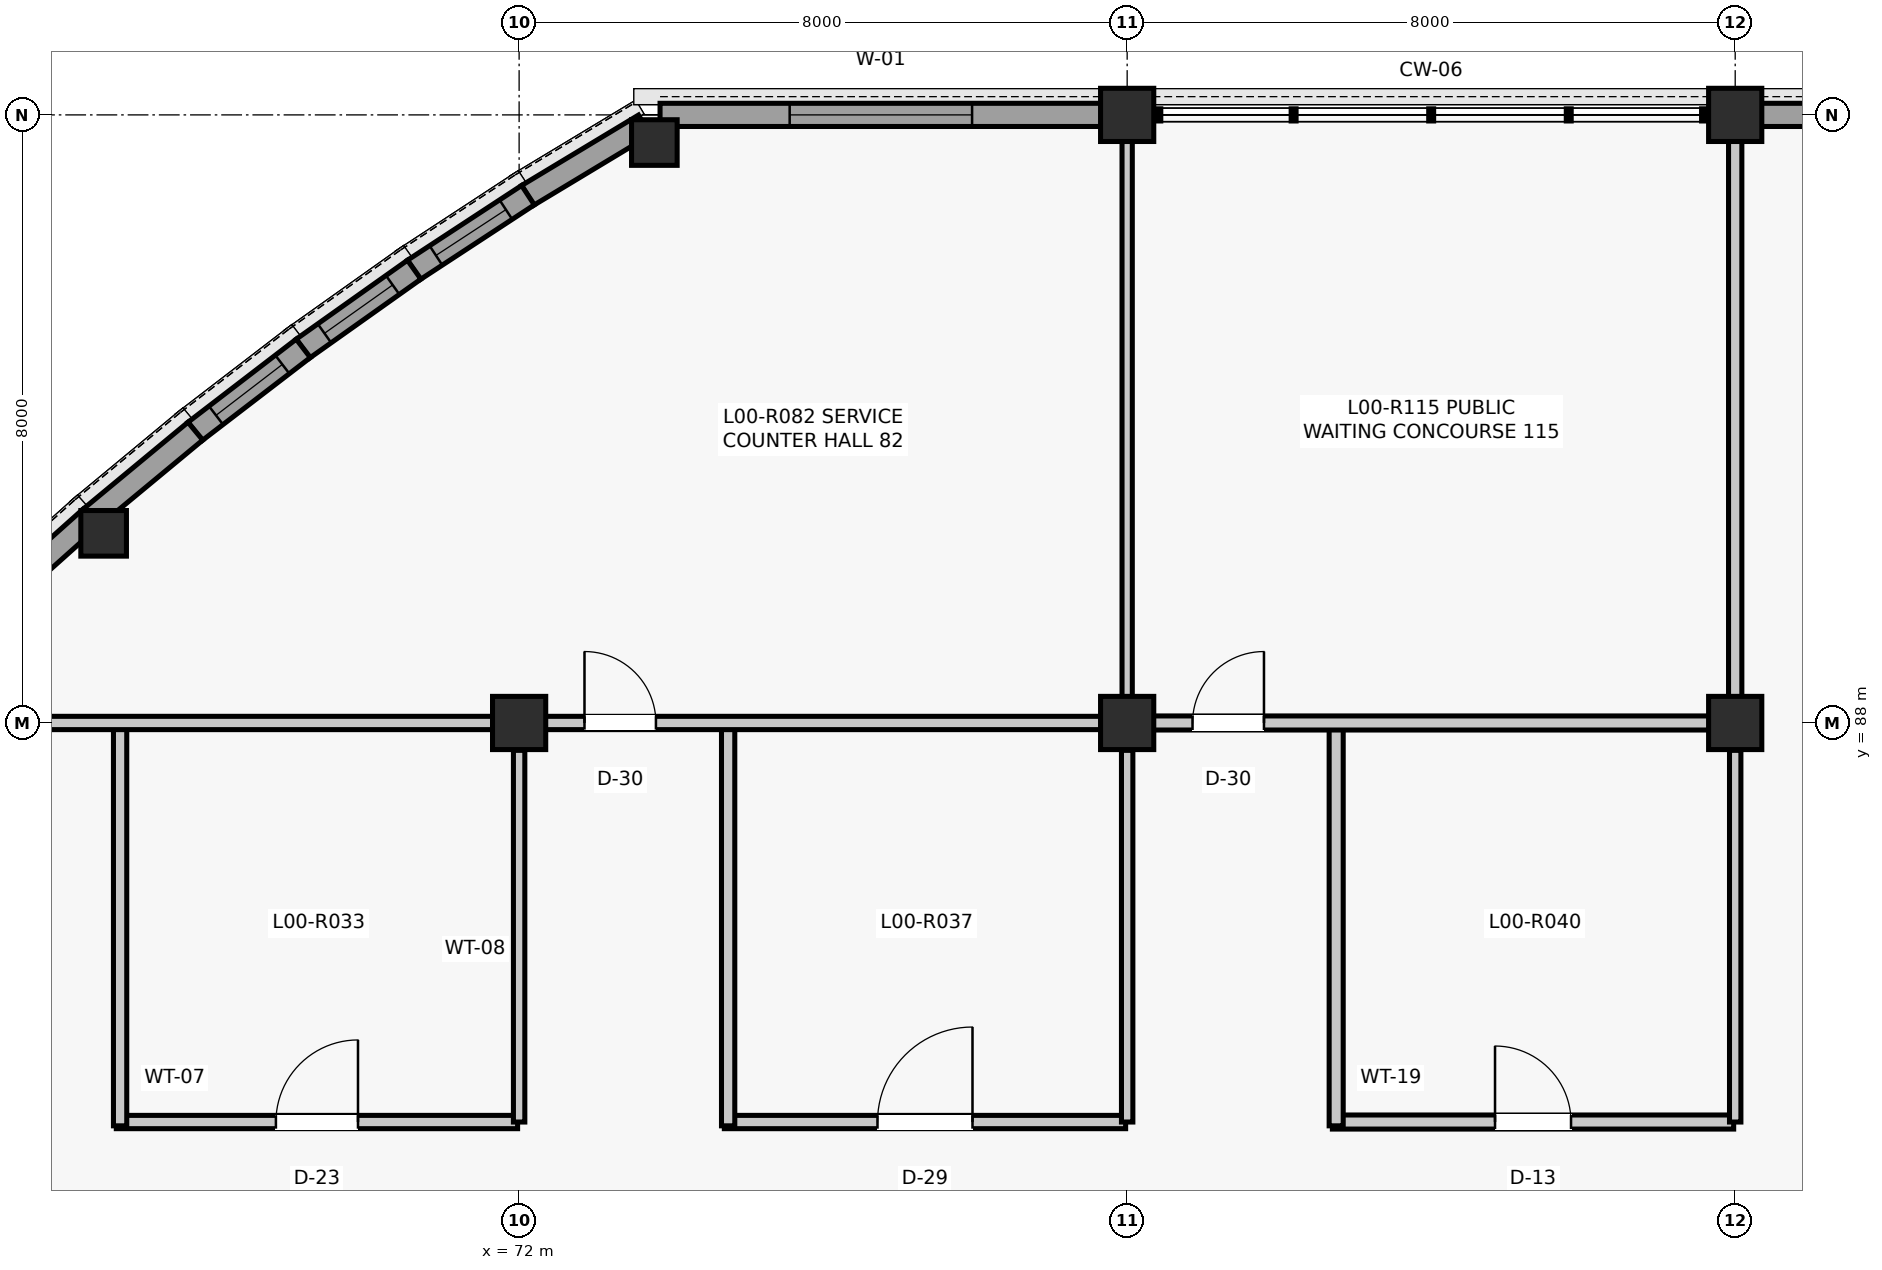
"""IFC4 building model, lengths in metres.
Left out: names, types, materials, properties, quantities, classifications, styles, units other than length and angle.
Written with IfcOpenShell. Run it as: python <this file> out.ifc"""

import sys

from ifc_helpers import new_model, si_unit, direction, frame, frame_2d, origin, origin_2d, place, context, subcontext, project, spatial, rectangle, extrude, element, fill, save


model = new_model("IFC4")
c1 = context("Model", 3, precision=1e-05, world=origin(), true_north=direction((0.0, 1.0)))
c2 = subcontext(c1, "Body", "Model", "MODEL_VIEW")
j1 = project(units=[si_unit("LENGTHUNIT", "METRE"), si_unit("PLANEANGLEUNIT", "RADIAN")], contexts=[c1])
p1 = place(None, origin())
s1 = spatial("IfcSite", under=j1, at=p1, CompositionType="ELEMENT")
p2 = place(p1, origin())
s2 = spatial("IfcBuilding", under=s1, at=p2, CompositionType="ELEMENT")
p3 = place(p2, origin())
s3 = spatial("IfcBuildingStorey", under=s2, at=p3, CompositionType="ELEMENT", Elevation=0.0)
for number, where, z_axis, x_axis in (
    (1, (72.0, 88.0, 0.0), (0.0, 0.0, 1.0), (1.0, 0.0, 0.0)),
    (2, (80.0, 88.0, 0.0), (0.0, 0.0, 1.0), (1.0, 0.0, 0.0)),
    (3, (80.0, 96.0, 0.0), (0.0, 0.0, 1.0), (1.0, 0.0, 0.0)),
    (4, (88.0, 88.0, 0.0), (0.0, 0.0, 1.0), (1.0, 0.0, 0.0)),
    (5, (88.0, 96.0, 0.0), (0.0, 0.0, 1.0), (1.0, 0.0, 0.0)),
):
    element("IfcColumn", number, at=place(p3, frame(where, z_axis=z_axis, x_axis=x_axis)), inside=s3, PredefinedType="COLUMN", context=c2, shape_type="SweptSolid", body=[
        extrude(rectangle(XDim=0.7, YDim=0.7, at=origin_2d()), origin(), (0.0, 0.0, 1.0), 5.28),
    ])
for number, where, z_axis, x_axis in (
    (6, (73.779, 95.636, 0.0), (0.0, 0.0, 1.0), (1.0, 0.0, 0.0)),
    (7, (66.533, 90.495, 0.0), (0.0, 0.0, 1.0), (1.0, 0.0, 0.0)),
):
    element("IfcColumn", number, at=place(p3, frame(where, z_axis=z_axis, x_axis=x_axis)), inside=s3, PredefinedType="COLUMN", context=c2, shape_type="SweptSolid", body=[
        extrude(rectangle(XDim=0.6, YDim=0.6, at=origin_2d()), origin(), (0.0, 0.0, 1.0), 5.28),
    ])
p4 = place(p3, frame((73.649, 95.867, 0.0), z_axis=(0.0, 0.0, 1.0), x_axis=(-0.856543302071, -0.51607516088, 0.0)))
e8 = element("IfcWall", 8, at=p4, inside=s3, PredefinedType="SOLIDWALL", context=c2, shape_type="SweptSolid", body=[
    extrude(rectangle(XDim=1.795, YDim=0.305, at=frame_2d((0.897, 0.0))), origin(), (0.0, 0.0, 1.0), 5.035),
])
p5 = place(p3, frame((72.117, 94.944, 0.0), z_axis=(0.0, 0.0, 1.0), x_axis=(-0.836686786408, -0.547681678944, 0.0)))
e9 = element("IfcWall", 9, at=p5, inside=s3, PredefinedType="SOLIDWALL", context=c2, shape_type="SweptSolid", body=[
    extrude(rectangle(XDim=1.795, YDim=0.305, at=frame_2d((0.897, 0.0))), origin(), (0.0, 0.0, 1.0), 5.035),
])
p6 = place(p5, frame((0.347, 0.0, 0.9)))
e10 = element("IfcOpeningElement", 10, at=p6, cuts=e9, PredefinedType="OPENING", context=c2, shape_type="SweptSolid", body=[
    extrude(rectangle(XDim=1.1, YDim=2.1, at=frame_2d((0.55, 1.05))), frame((0.0, 0.162, 0.0), z_axis=(0.0, -1.0, 0.0), x_axis=(1.0, 0.0, 0.0)), (0.0, 0.0, 1.0), 0.325),
])
p7 = place(p3, frame((70.62, 93.964, 0.0), z_axis=(0.0, 0.0, 1.0), x_axis=(-0.815567185578, -0.578662393636, 0.0)))
e11 = element("IfcWall", 11, at=p7, inside=s3, PredefinedType="SOLIDWALL", context=c2, shape_type="SweptSolid", body=[
    extrude(rectangle(XDim=1.795, YDim=0.305, at=frame_2d((0.897, 0.0))), origin(), (0.0, 0.0, 1.0), 5.035),
])
p8 = place(p7, frame((0.348, 0.0, 0.9)))
e12 = element("IfcOpeningElement", 12, at=p8, cuts=e11, PredefinedType="OPENING", context=c2, shape_type="SweptSolid", body=[
    extrude(rectangle(XDim=1.1, YDim=2.1, at=frame_2d((0.55, 1.05))), frame((0.0, 0.162, 0.0), z_axis=(0.0, -1.0, 0.0), x_axis=(1.0, 0.0, 0.0)), (0.0, 0.0, 1.0), 0.325),
])
p9 = place(p3, frame((69.16, 92.928, 0.0), z_axis=(0.0, 0.0, 1.0), x_axis=(-0.793341406114, -0.608776981616, 0.0)))
e13 = element("IfcWall", 13, at=p9, inside=s3, PredefinedType="SOLIDWALL", context=c2, shape_type="SweptSolid", body=[
    extrude(rectangle(XDim=1.795, YDim=0.305, at=frame_2d((0.897, 0.0))), origin(), (0.0, 0.0, 1.0), 5.035),
])
p10 = place(p9, frame((0.347, 0.0, 0.9)))
e14 = element("IfcOpeningElement", 14, at=p10, cuts=e13, PredefinedType="OPENING", context=c2, shape_type="SweptSolid", body=[
    extrude(rectangle(XDim=1.1, YDim=2.1, at=frame_2d((0.55, 1.05))), frame((0.0, 0.162, 0.0), z_axis=(0.0, -1.0, 0.0), x_axis=(1.0, 0.0, 0.0)), (0.0, 0.0, 1.0), 0.325),
])
p11 = place(p3, frame((67.74, 91.839, 0.0), z_axis=(0.0, 0.0, 1.0), x_axis=(-0.769991012207, -0.638054732073, 0.0)))
e15 = element("IfcWall", 15, at=p11, inside=s3, PredefinedType="SOLIDWALL", context=c2, shape_type="SweptSolid", body=[
    extrude(rectangle(XDim=1.795, YDim=0.305, at=frame_2d((0.897, 0.0))), origin(), (0.0, 0.0, 1.0), 5.035),
])
p12 = place(p3, frame((66.363, 90.698, 0.0), z_axis=(0.0, 0.0, 1.0), x_axis=(-0.745703543965, -0.666277888361, 0.0)))
e16 = element("IfcWall", 16, at=p12, inside=s3, PredefinedType="SOLIDWALL", context=c2, shape_type="SweptSolid", body=[
    extrude(rectangle(XDim=1.795, YDim=0.305, at=frame_2d((0.897, 0.0))), origin(), (0.0, 0.0, 1.0), 5.035),
])
p13 = place(p3, frame((73.854, 96.0, 0.0), z_axis=(0.0, 0.0, 1.0), x_axis=(1.0, 0.0, 0.0)))
e17 = element("IfcWall", 17, at=p13, inside=s3, PredefinedType="SOLIDWALL", context=c2, shape_type="SweptSolid", body=[
    extrude(rectangle(XDim=5.811, YDim=0.305, at=frame_2d((2.905, 0.0))), origin(), (0.0, 0.0, 1.0), 5.035),
])
p14 = place(p13, frame((1.705, 0.0, 0.9)))
e18 = element("IfcOpeningElement", 18, at=p14, cuts=e17, PredefinedType="OPENING", context=c2, shape_type="SweptSolid", body=[
    extrude(rectangle(XDim=2.4, YDim=2.8, at=frame_2d((1.2, 1.4))), frame((0.0, 0.162, 0.0), z_axis=(0.0, -1.0, 0.0), x_axis=(1.0, 0.0, 0.0)), (0.0, 0.0, 1.0), 0.325),
])
p15 = place(p3, frame((88.335, 96.0, 0.0), z_axis=(0.0, 0.0, 1.0), x_axis=(1.0, 0.0, 0.0)))
e19 = element("IfcWall", 19, at=p15, inside=s3, PredefinedType="SOLIDWALL", context=c2, shape_type="SweptSolid", body=[
    extrude(rectangle(XDim=7.33, YDim=0.305, at=frame_2d((3.665, 0.0))), origin(), (0.0, 0.0, 1.0), 4.677),
])
p16 = place(p15, frame((0.744, 0.0, 0.95)))
e20 = element("IfcOpeningElement", 20, at=p16, cuts=e19, PredefinedType="OPENING", context=c2, shape_type="SweptSolid", body=[
    extrude(rectangle(XDim=1.15, YDim=1.65, at=frame_2d((0.575, 0.825))), frame((0.0, 0.162, 0.0), z_axis=(0.0, -1.0, 0.0), x_axis=(1.0, 0.0, 0.0)), (0.0, 0.0, 1.0), 0.325),
])
p17 = place(p15, frame((5.436, 0.0, 0.95)))
e21 = element("IfcOpeningElement", 21, at=p17, cuts=e19, PredefinedType="OPENING", context=c2, shape_type="SweptSolid", body=[
    extrude(rectangle(XDim=1.15, YDim=1.65, at=frame_2d((0.575, 0.825))), frame((0.0, 0.162, 0.0), z_axis=(0.0, -1.0, 0.0), x_axis=(1.0, 0.0, 0.0)), (0.0, 0.0, 1.0), 0.325),
])
p18 = place(p3, frame((66.7, 82.75, 0.0), z_axis=(0.0, 0.0, 1.0), x_axis=(1.0, 0.0, 0.0)))
e22 = element("IfcWall", 22, at=p18, inside=s3, PredefinedType="PARTITIONING", context=c2, shape_type="SweptSolid", body=[
    extrude(rectangle(XDim=5.28, YDim=0.175, at=frame_2d((2.64, 0.0))), origin(), (0.0, 0.0, 1.0), 4.471),
])
p19 = place(p18, frame((2.1, 0.0, 0.0)))
e23 = element("IfcOpeningElement", 23, at=p19, cuts=e22, PredefinedType="OPENING", context=c2, shape_type="SweptSolid", body=[
    extrude(rectangle(XDim=1.08, YDim=2.2, at=frame_2d((0.54, 1.1))), frame((0.0, 0.097, 0.0), z_axis=(0.0, -1.0, 0.0), x_axis=(1.0, 0.0, 0.0)), (0.0, 0.0, 1.0), 0.195),
])
p20 = place(p3, frame((66.75, 82.7, 0.0), z_axis=(0.0, 0.0, 1.0), x_axis=(0.0, 1.0, 0.0)))
e24 = element("IfcWall", 24, at=p20, inside=s3, PredefinedType="PARTITIONING", context=c2, shape_type="SweptSolid", body=[
    extrude(rectangle(XDim=5.28, YDim=0.175, at=frame_2d((2.64, 0.0))), origin(), (0.0, 0.0, 1.0), 5.025),
])
p21 = place(p3, frame((72.0, 82.75, 0.0), z_axis=(0.0, 0.0, 1.0), x_axis=(0.0, 1.0, 0.0)))
e25 = element("IfcWall", 25, at=p21, inside=s3, PredefinedType="PARTITIONING", context=c2, shape_type="SweptSolid", body=[
    extrude(rectangle(XDim=4.89, YDim=0.15, at=frame_2d((2.445, 0.0))), origin(), (0.0, 0.0, 1.0), 4.471),
])
p22 = place(p3, frame((74.7, 82.75, 0.0), z_axis=(0.0, 0.0, 1.0), x_axis=(1.0, 0.0, 0.0)))
e26 = element("IfcWall", 26, at=p22, inside=s3, PredefinedType="PARTITIONING", context=c2, shape_type="SweptSolid", body=[
    extrude(rectangle(XDim=5.28, YDim=0.175, at=frame_2d((2.64, 0.0))), origin(), (0.0, 0.0, 1.0), 4.403),
])
p23 = place(p22, frame((2.015, 0.0, 0.0)))
e27 = element("IfcOpeningElement", 27, at=p23, cuts=e26, PredefinedType="OPENING", context=c2, shape_type="SweptSolid", body=[
    extrude(rectangle(XDim=1.25, YDim=2.18, at=frame_2d((0.625, 1.09))), frame((0.0, 0.097, 0.0), z_axis=(0.0, -1.0, 0.0), x_axis=(1.0, 0.0, 0.0)), (0.0, 0.0, 1.0), 0.195),
])
p24 = place(p3, frame((74.75, 82.7, 0.0), z_axis=(0.0, 0.0, 1.0), x_axis=(0.0, 1.0, 0.0)))
e28 = element("IfcWall", 28, at=p24, inside=s3, PredefinedType="PARTITIONING", context=c2, shape_type="SweptSolid", body=[
    extrude(rectangle(XDim=5.28, YDim=0.175, at=frame_2d((2.64, 0.0))), origin(), (0.0, 0.0, 1.0), 4.327),
])
p25 = place(p3, frame((80.0, 82.75, 0.0), z_axis=(0.0, 0.0, 1.0), x_axis=(0.0, 1.0, 0.0)))
e29 = element("IfcWall", 29, at=p25, inside=s3, PredefinedType="PARTITIONING", context=c2, shape_type="SweptSolid", body=[
    extrude(rectangle(XDim=4.89, YDim=0.15, at=frame_2d((2.445, 0.0))), origin(), (0.0, 0.0, 1.0), 4.403),
])
p26 = place(p3, frame((82.7, 82.75, 0.0), z_axis=(0.0, 0.0, 1.0), x_axis=(1.0, 0.0, 0.0)))
e30 = element("IfcWall", 30, at=p26, inside=s3, PredefinedType="PARTITIONING", context=c2, shape_type="SweptSolid", body=[
    extrude(rectangle(XDim=5.28, YDim=0.185, at=frame_2d((2.64, 0.0))), origin(), (0.0, 0.0, 1.0), 4.412),
])
p27 = place(p26, frame((2.14, 0.0, 0.0)))
e31 = element("IfcOpeningElement", 31, at=p27, cuts=e30, PredefinedType="OPENING", context=c2, shape_type="SweptSolid", body=[
    extrude(rectangle(XDim=1.0, YDim=2.15, at=frame_2d((0.5, 1.075))), frame((0.0, 0.103, 0.0), z_axis=(0.0, -1.0, 0.0), x_axis=(1.0, 0.0, 0.0)), (0.0, 0.0, 1.0), 0.205),
])
p28 = place(p3, frame((82.75, 82.7, 0.0), z_axis=(0.0, 0.0, 1.0), x_axis=(0.0, 1.0, 0.0)))
e32 = element("IfcWall", 32, at=p28, inside=s3, PredefinedType="PARTITIONING", context=c2, shape_type="SweptSolid", body=[
    extrude(rectangle(XDim=5.28, YDim=0.185, at=frame_2d((2.64, 0.0))), origin(), (0.0, 0.0, 1.0), 4.403),
])
p29 = place(p3, frame((88.0, 82.75, 0.0), z_axis=(0.0, 0.0, 1.0), x_axis=(0.0, 1.0, 0.0)))
e33 = element("IfcWall", 33, at=p29, inside=s3, PredefinedType="PARTITIONING", context=c2, shape_type="SweptSolid", body=[
    extrude(rectangle(XDim=4.89, YDim=0.15, at=frame_2d((2.445, 0.0))), origin(), (0.0, 0.0, 1.0), 4.412),
])
p30 = place(p3, frame((64.0, 88.0, 0.0), z_axis=(0.0, 0.0, 1.0), x_axis=(1.0, 0.0, 0.0)))
e34 = element("IfcWall", 34, at=p30, inside=s3, PredefinedType="PARTITIONING", context=c2, shape_type="SweptSolid", body=[
    extrude(rectangle(XDim=7.66, YDim=0.175, at=frame_2d((3.83, 0.0))), origin(), (0.0, 0.0, 1.0), 5.025),
])
p31 = place(p30, frame((0.52, 0.0, 0.0)))
e35 = element("IfcOpeningElement", 35, at=p31, cuts=e34, PredefinedType="OPENING", context=c2, shape_type="SweptSolid", body=[
    extrude(rectangle(XDim=0.94, YDim=2.12, at=frame_2d((0.47, 1.06))), frame((0.0, 0.097, 0.0), z_axis=(0.0, -1.0, 0.0), x_axis=(1.0, 0.0, 0.0)), (0.0, 0.0, 1.0), 0.195),
])
p32 = place(p3, frame((72.34, 88.0, 0.0), z_axis=(0.0, 0.0, 1.0), x_axis=(1.0, 0.0, 0.0)))
e36 = element("IfcWall", 36, at=p32, inside=s3, PredefinedType="PARTITIONING", context=c2, shape_type="SweptSolid", body=[
    extrude(rectangle(XDim=7.32, YDim=0.175, at=frame_2d((3.66, 0.0))), origin(), (0.0, 0.0, 1.0), 4.327),
])
p33 = place(p32, frame((0.52, 0.0, 0.0)))
e37 = element("IfcOpeningElement", 37, at=p33, cuts=e36, PredefinedType="OPENING", context=c2, shape_type="SweptSolid", body=[
    extrude(rectangle(XDim=0.94, YDim=2.12, at=frame_2d((0.47, 1.06))), frame((0.0, 0.097, 0.0), z_axis=(0.0, -1.0, 0.0), x_axis=(1.0, 0.0, 0.0)), (0.0, 0.0, 1.0), 0.195),
])
p34 = place(p3, frame((80.0, 88.34, 0.0), z_axis=(0.0, 0.0, 1.0), x_axis=(0.0, 1.0, 0.0)))
e38 = element("IfcWall", 38, at=p34, inside=s3, PredefinedType="PARTITIONING", context=c2, shape_type="SweptSolid", body=[
    extrude(rectangle(XDim=7.32, YDim=0.135, at=frame_2d((3.66, 0.0))), origin(), (0.0, 0.0, 1.0), 4.412),
])
p35 = place(p3, frame((80.34, 88.0, 0.0), z_axis=(0.0, 0.0, 1.0), x_axis=(1.0, 0.0, 0.0)))
e39 = element("IfcWall", 39, at=p35, inside=s3, PredefinedType="PARTITIONING", context=c2, shape_type="SweptSolid", body=[
    extrude(rectangle(XDim=7.32, YDim=0.185, at=frame_2d((3.66, 0.0))), origin(), (0.0, 0.0, 1.0), 4.403),
])
p36 = place(p35, frame((0.52, 0.0, 0.0)))
e40 = element("IfcOpeningElement", 40, at=p36, cuts=e39, PredefinedType="OPENING", context=c2, shape_type="SweptSolid", body=[
    extrude(rectangle(XDim=0.94, YDim=2.12, at=frame_2d((0.47, 1.06))), frame((0.0, 0.103, 0.0), z_axis=(0.0, -1.0, 0.0), x_axis=(1.0, 0.0, 0.0)), (0.0, 0.0, 1.0), 0.205),
])
p37 = place(p3, frame((88.0, 88.34, 0.0), z_axis=(0.0, 0.0, 1.0), x_axis=(0.0, 1.0, 0.0)))
e41 = element("IfcWall", 41, at=p37, inside=s3, PredefinedType="PARTITIONING", context=c2, shape_type="SweptSolid", body=[
    extrude(rectangle(XDim=7.32, YDim=0.175, at=frame_2d((3.66, 0.0))), origin(), (0.0, 0.0, 1.0), 4.404),
])
p38 = place(p6, origin())
e42 = element("IfcWindow", 42, at=p38, inside=s3, PartitioningType="SINGLE_PANEL", PredefinedType="WINDOW", context=c2, shape_type="SweptSolid", body=[
    extrude(rectangle(XDim=1.1, YDim=2.1, at=frame_2d((0.55, 1.05))), frame((0.0, 0.03, 0.0), z_axis=(0.0, -1.0, 0.0), x_axis=(1.0, 0.0, 0.0)), (0.0, 0.0, 1.0), 0.06),
])
fill(e10, e42)
p39 = place(p8, origin())
e43 = element("IfcWindow", 43, at=p39, inside=s3, PartitioningType="SINGLE_PANEL", PredefinedType="WINDOW", context=c2, shape_type="SweptSolid", body=[
    extrude(rectangle(XDim=1.1, YDim=2.1, at=frame_2d((0.55, 1.05))), frame((0.0, 0.03, 0.0), z_axis=(0.0, -1.0, 0.0), x_axis=(1.0, 0.0, 0.0)), (0.0, 0.0, 1.0), 0.06),
])
fill(e12, e43)
p40 = place(p10, origin())
e44 = element("IfcWindow", 44, at=p40, inside=s3, PartitioningType="SINGLE_PANEL", PredefinedType="WINDOW", context=c2, shape_type="SweptSolid", body=[
    extrude(rectangle(XDim=1.1, YDim=2.1, at=frame_2d((0.55, 1.05))), frame((0.0, 0.03, 0.0), z_axis=(0.0, -1.0, 0.0), x_axis=(1.0, 0.0, 0.0)), (0.0, 0.0, 1.0), 0.06),
])
fill(e14, e44)
p41 = place(p14, origin())
e45 = element("IfcWindow", 45, at=p41, inside=s3, PartitioningType="SINGLE_PANEL", PredefinedType="WINDOW", context=c2, shape_type="SweptSolid", body=[
    extrude(rectangle(XDim=2.4, YDim=2.8, at=frame_2d((1.2, 1.4))), frame((0.0, 0.03, 0.0), z_axis=(0.0, -1.0, 0.0), x_axis=(1.0, 0.0, 0.0)), (0.0, 0.0, 1.0), 0.06),
])
fill(e18, e45)
p42 = place(p19, origin())
e46 = element("IfcDoor", 46, at=p42, inside=s3, OperationType="SINGLE_SWING_RIGHT", PredefinedType="DOOR", context=c2, shape_type="SweptSolid", body=[
    extrude(rectangle(XDim=1.08, YDim=2.2, at=frame_2d((0.54, 1.1))), frame((0.0, 0.025, 0.0), z_axis=(0.0, -1.0, 0.0), x_axis=(1.0, 0.0, 0.0)), (0.0, 0.0, 1.0), 0.05),
])
fill(e23, e46)
p43 = place(p23, origin())
e47 = element("IfcDoor", 47, at=p43, inside=s3, OperationType="SINGLE_SWING_RIGHT", PredefinedType="DOOR", context=c2, shape_type="SweptSolid", body=[
    extrude(rectangle(XDim=1.25, YDim=2.18, at=frame_2d((0.625, 1.09))), frame((0.0, 0.025, 0.0), z_axis=(0.0, -1.0, 0.0), x_axis=(1.0, 0.0, 0.0)), (0.0, 0.0, 1.0), 0.05),
])
fill(e27, e47)
p44 = place(p27, origin())
e48 = element("IfcDoor", 48, at=p44, inside=s3, OperationType="SINGLE_SWING_LEFT", PredefinedType="DOOR", context=c2, shape_type="SweptSolid", body=[
    extrude(rectangle(XDim=1.0, YDim=2.15, at=frame_2d((0.5, 1.075))), frame((0.0, 0.025, 0.0), z_axis=(0.0, -1.0, 0.0), x_axis=(1.0, 0.0, 0.0)), (0.0, 0.0, 1.0), 0.05),
])
fill(e31, e48)
p45 = place(p33, origin())
e49 = element("IfcDoor", 49, at=p45, inside=s3, OperationType="SINGLE_SWING_LEFT", PredefinedType="DOOR", context=c2, shape_type="SweptSolid", body=[
    extrude(rectangle(XDim=0.94, YDim=2.12, at=frame_2d((0.47, 1.06))), frame((0.0, 0.025, 0.0), z_axis=(0.0, -1.0, 0.0), x_axis=(1.0, 0.0, 0.0)), (0.0, 0.0, 1.0), 0.05),
])
fill(e37, e49)
p46 = place(p36, origin())
e50 = element("IfcDoor", 50, at=p46, inside=s3, OperationType="SINGLE_SWING_RIGHT", PredefinedType="DOOR", context=c2, shape_type="SweptSolid", body=[
    extrude(rectangle(XDim=0.94, YDim=2.12, at=frame_2d((0.47, 1.06))), frame((0.0, 0.025, 0.0), z_axis=(0.0, -1.0, 0.0), x_axis=(1.0, 0.0, 0.0)), (0.0, 0.0, 1.0), 0.05),
])
fill(e40, e50)
save(model, sys.argv[1])
